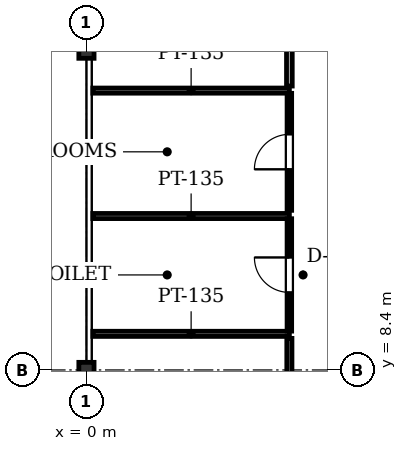
"""IFC4 building model, lengths in metres.
Left out: names, types, materials, properties, quantities, classifications, styles, units other than length and angle.
Written with IfcOpenShell. Run it as: python <this file> out.ifc"""

import sys

from ifc_helpers import new_model, si_unit, direction, frame, frame_2d, origin, origin_2d, place, context, subcontext, project, spatial, rectangle, i_section, extrude, element, fill, save


model = new_model("IFC4")
c1 = context("Model", 3, precision=1e-05, world=origin(), true_north=direction((0.0, 1.0)))
c2 = subcontext(c1, "Body", "Model", "MODEL_VIEW")
j1 = project(units=[si_unit("LENGTHUNIT", "METRE"), si_unit("PLANEANGLEUNIT", "RADIAN")], contexts=[c1])
p1 = place(None, origin())
s1 = spatial("IfcSite", under=j1, at=p1, CompositionType="ELEMENT")
p2 = place(p1, origin())
s2 = spatial("IfcBuilding", under=s1, at=p2, CompositionType="ELEMENT")
p3 = place(p2, frame((0.0, 0.0, 109.0)))
s3 = spatial("IfcBuildingStorey", under=s2, at=p3, CompositionType="ELEMENT", Elevation=109.0)
for number, where, z_axis, x_axis in (
    (1, (0.0, 8.4, 0.0), (0.0, 0.0, 1.0), (1.0, 0.0, 0.0)),
    (2, (0.0, 16.8, 0.0), (0.0, 0.0, 1.0), (1.0, 0.0, 0.0)),
):
    element("IfcColumn", number, at=place(p3, frame(where, z_axis=z_axis, x_axis=x_axis)), inside=s3, PredefinedType="COLUMN", context=c2, shape_type="SweptSolid", body=[
        extrude(i_section(OverallWidth=0.4, OverallDepth=0.4, WebThickness=0.025, FlangeThickness=0.04, at=origin_2d()), origin(), (0.0, 0.0, 1.0), 4.1),
    ])
for number, where, z_axis, x_axis in (
    (3, (5.34, 12.45, 0.0), (0.0, 0.0, 1.0), (-1.0, 0.0, 0.0)),
    (4, (0.169, 9.35, 0.0), (0.0, 0.0, 1.0), (1.0, 0.0, 0.0)),
):
    element("IfcWall", number, at=place(p3, frame(where, z_axis=z_axis, x_axis=x_axis)), inside=s3, PredefinedType="PARTITIONING", context=c2, shape_type="SweptSolid", body=[
        extrude(rectangle(XDim=5.171, YDim=0.135, at=frame_2d((2.585, 0.0))), origin(), (0.0, 0.0, 1.0), 3.394),
    ])
p4 = place(p3, frame((5.34, 9.421, 0.0), z_axis=(0.0, 0.0, 1.0), x_axis=(0.0, 1.0, 0.0)))
e5 = element("IfcWall", 5, at=p4, inside=s3, PredefinedType="PARTITIONING", context=c2, shape_type="SweptSolid", body=[
    extrude(rectangle(XDim=2.957, YDim=0.12, at=frame_2d((1.479, 0.0))), origin(), (0.0, 0.0, 1.0), 3.75),
])
p5 = place(p4, frame((1.019, 0.0, 0.0)))
e6 = element("IfcOpeningElement", 6, at=p5, cuts=e5, PredefinedType="OPENING", context=c2, shape_type="SweptSolid", body=[
    extrude(rectangle(XDim=0.92, YDim=2.1, at=frame_2d((0.46, 1.05))), frame((0.0, 0.07, 0.0), z_axis=(0.0, -1.0, 0.0), x_axis=(1.0, 0.0, 0.0)), (0.0, 0.0, 1.0), 0.14),
])
p6 = place(p3, frame((5.34, 15.75, 0.0), z_axis=(0.0, 0.0, 1.0), x_axis=(-1.0, 0.0, 0.0)))
e7 = element("IfcWall", 7, at=p6, inside=s3, PredefinedType="PARTITIONING", context=c2, shape_type="SweptSolid", body=[
    extrude(rectangle(XDim=5.171, YDim=0.135, at=frame_2d((2.585, 0.0))), origin(), (0.0, 0.0, 1.0), 3.394),
])
p7 = place(p3, frame((5.34, 12.6, 0.0), z_axis=(0.0, 0.0, 1.0), x_axis=(0.0, 1.0, 0.0)))
e8 = element("IfcWall", 8, at=p7, inside=s3, PredefinedType="PARTITIONING", context=c2, shape_type="SweptSolid", body=[
    extrude(rectangle(XDim=3.078, YDim=0.12, at=frame_2d((1.539, 0.0))), origin(), (0.0, 0.0, 1.0), 3.75),
])
p8 = place(p7, frame((1.079, 0.0, 0.0)))
e9 = element("IfcOpeningElement", 9, at=p8, cuts=e8, PredefinedType="OPENING", context=c2, shape_type="SweptSolid", body=[
    extrude(rectangle(XDim=0.92, YDim=2.1, at=frame_2d((0.46, 1.05))), frame((0.0, 0.07, 0.0), z_axis=(0.0, -1.0, 0.0), x_axis=(1.0, 0.0, 0.0)), (0.0, 0.0, 1.0), 0.14),
])
p9 = place(p3, frame((5.34, 5.4, 0.0), z_axis=(0.0, 0.0, 1.0), x_axis=(0.0, 1.0, 0.0)))
e10 = element("IfcWall", 10, at=p9, inside=s3, PredefinedType="PARTITIONING", context=c2, shape_type="SweptSolid", body=[
    extrude(rectangle(XDim=3.83, YDim=0.135, at=frame_2d((1.915, 0.0))), origin(), (0.0, 0.0, 1.0), 3.217),
])
p10 = place(p3, frame((5.34, 15.87, 0.0), z_axis=(0.0, 0.0, 1.0), x_axis=(0.0, 1.0, 0.0)))
e11 = element("IfcWall", 11, at=p10, inside=s3, PredefinedType="PARTITIONING", context=c2, shape_type="SweptSolid", body=[
    extrude(rectangle(XDim=24.93, YDim=0.15, at=frame_2d((12.465, 0.0))), origin(), (0.0, 0.0, 1.0), 3.217),
])
p11 = place(p10, frame((11.99, 0.0, 0.0)))
e12 = element("IfcOpeningElement", 12, at=p11, cuts=e11, PredefinedType="OPENING", context=c2, shape_type="SweptSolid", body=[
    extrude(rectangle(XDim=0.95, YDim=2.15, at=frame_2d((0.475, 1.075))), frame((0.0, 0.085, 0.0), z_axis=(0.0, -1.0, 0.0), x_axis=(1.0, 0.0, 0.0)), (0.0, 0.0, 1.0), 0.17),
])
p12 = place(p5, origin())
e13 = element("IfcDoor", 13, at=p12, inside=s3, OperationType="SINGLE_SWING_RIGHT", PredefinedType="DOOR", context=c2, shape_type="SweptSolid", body=[
    extrude(rectangle(XDim=0.92, YDim=2.1, at=frame_2d((0.46, 1.05))), frame((0.0, 0.025, 0.0), z_axis=(0.0, -1.0, 0.0), x_axis=(1.0, 0.0, 0.0)), (0.0, 0.0, 1.0), 0.05),
])
fill(e6, e13)
p13 = place(p8, origin())
e14 = element("IfcDoor", 14, at=p13, inside=s3, OperationType="SINGLE_SWING_LEFT", PredefinedType="DOOR", context=c2, shape_type="SweptSolid", body=[
    extrude(rectangle(XDim=0.92, YDim=2.1, at=frame_2d((0.46, 1.05))), frame((0.0, 0.025, 0.0), z_axis=(0.0, -1.0, 0.0), x_axis=(1.0, 0.0, 0.0)), (0.0, 0.0, 1.0), 0.05),
])
fill(e9, e14)
save(model, sys.argv[1])
